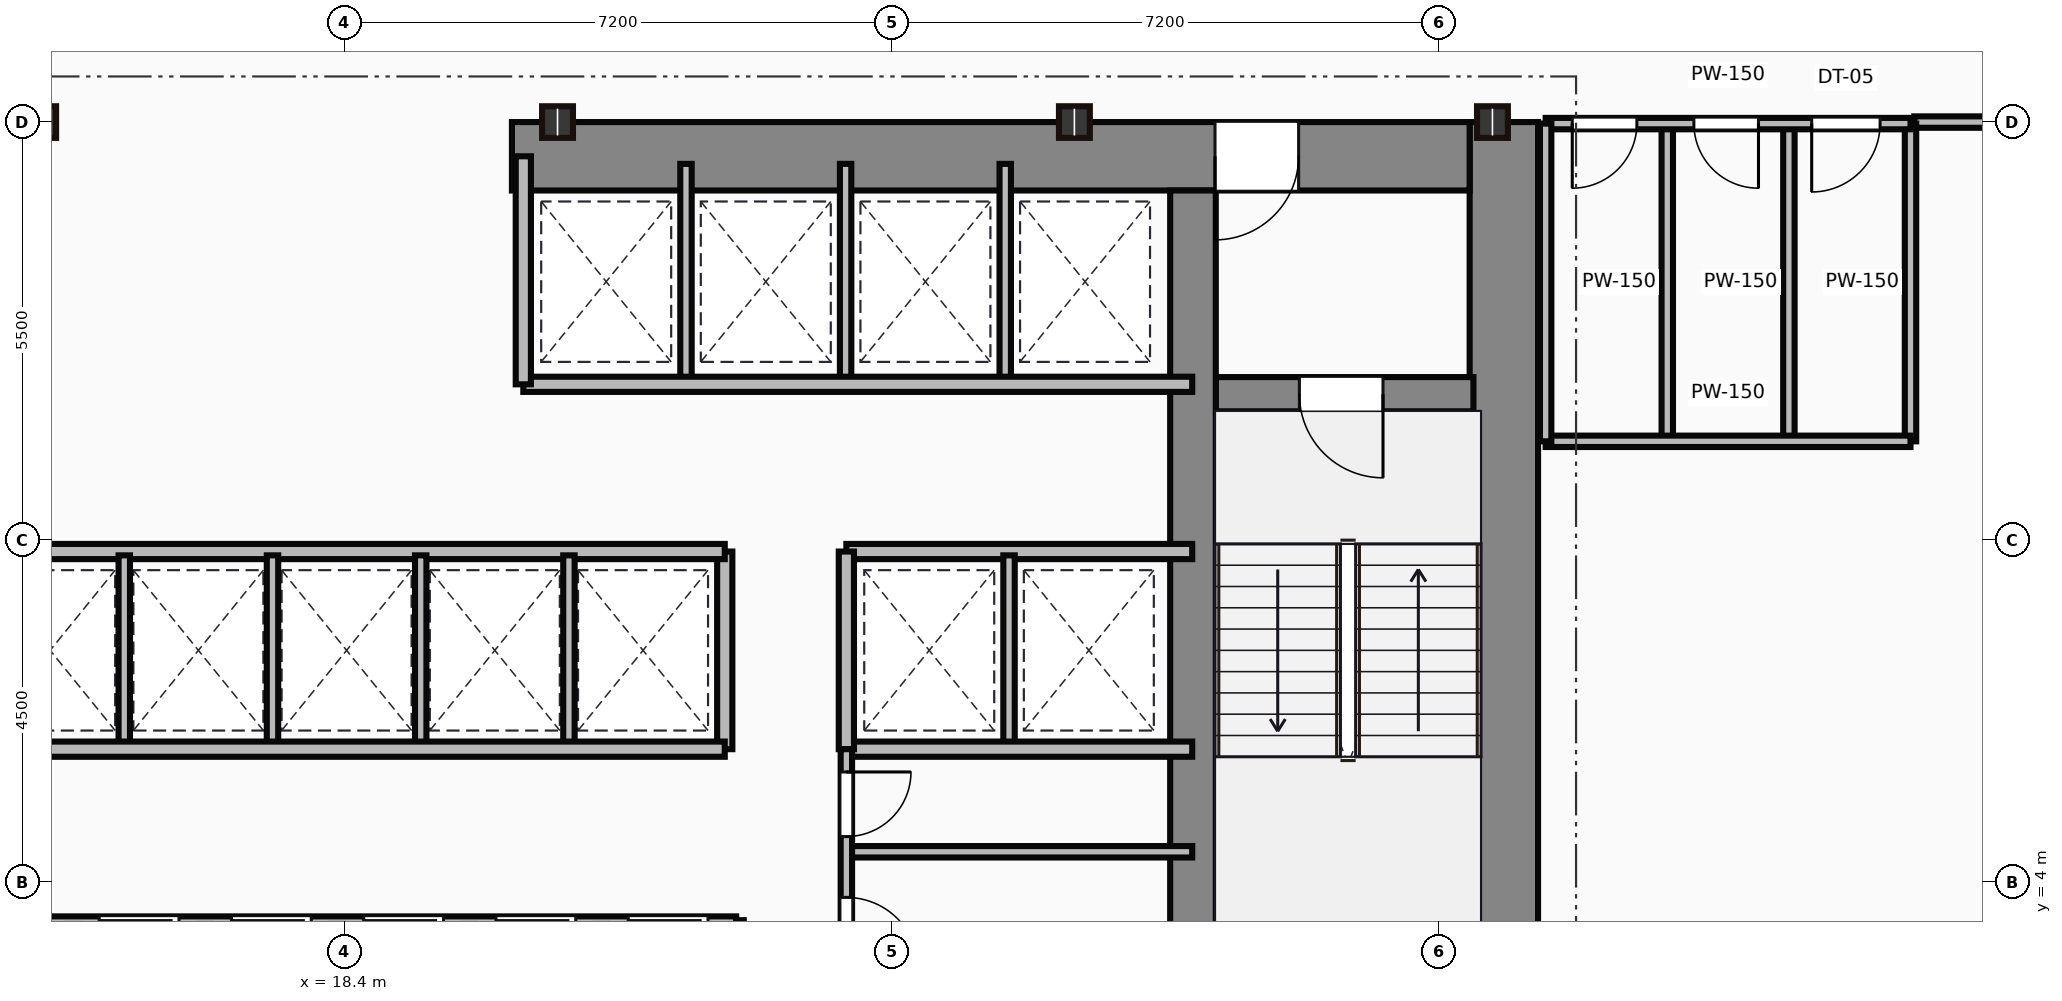
"""IFC4 building model, lengths in metres.
Left out: names, types, materials, properties, quantities, classifications, styles, units other than length and angle.
Written with IfcOpenShell. Run it as: python <this file> out.ifc"""

import sys

from ifc_helpers import new_model, si_unit, direction, frame, frame_2d, origin, origin_2d, place, context, subcontext, project, spatial, rectangle, i_section, extrude, source, transform, mapped, element, fill, save


model = new_model("IFC4")
c1 = context("Model", 3, precision=1e-05, world=origin(), true_north=direction((0.0, 1.0)))
c2 = subcontext(c1, "Body", "Model", "MODEL_VIEW")
j1 = project(units=[si_unit("LENGTHUNIT", "METRE"), si_unit("PLANEANGLEUNIT", "RADIAN")], contexts=[c1])
p1 = place(None, origin())
s1 = spatial("IfcSite", under=j1, at=p1, CompositionType="ELEMENT")
p2 = place(p1, origin())
s2 = spatial("IfcBuilding", under=s1, at=p2, CompositionType="ELEMENT")
p3 = place(p2, frame((0.0, 0.0, 72.65)))
s3 = spatial("IfcBuildingStorey", under=s2, at=p3, CompositionType="ELEMENT", Elevation=72.65)
m1 = source(origin(), c2, "Body", "SweptSolid", [
    extrude(rectangle(XDim=13.1, YDim=0.9, at=frame_2d((6.55, 0.0))), origin(), (0.0, 0.0, 1.0), 3.65),
])
p4 = place(p3, frame((33.65, 0.9, 0.0), z_axis=(0.0, 0.0, 1.0), x_axis=(0.0, 1.0, 0.0)))
e1 = element("IfcWall", 1, at=p4, inside=s3, PredefinedType="SHEAR", context=c2, shape_type="MappedRepresentation", body=[
    mapped(m1, transform((0.0, 0.0, 0.0))),
])
m2 = source(origin(), c2, "Body", "SweptSolid", [
    extrude(rectangle(XDim=12.6, YDim=0.9, at=frame_2d((6.3, 0.0))), origin(), (0.0, 0.0, 1.0), 3.65),
])
p5 = place(p3, frame((20.6, 13.55, 0.0), z_axis=(0.0, 0.0, 1.0), x_axis=(1.0, 0.0, 0.0)))
e2 = element("IfcWall", 2, at=p5, inside=s3, PredefinedType="SHEAR", context=c2, shape_type="MappedRepresentation", body=[
    mapped(m2, transform((0.0, 0.0, 0.0))),
])
p6 = place(p5, frame((9.25, 0.0, 0.0)))
e3 = element("IfcOpeningElement", 3, at=p6, cuts=e2, PredefinedType="OPENING", context=c2, shape_type="SweptSolid", body=[
    extrude(rectangle(XDim=1.1, YDim=2.15, at=frame_2d((0.55, 1.075))), frame((0.0, 0.46, 0.0), z_axis=(0.0, -1.0, 0.0), x_axis=(1.0, 0.0, 0.0)), (0.0, 0.0, 1.0), 0.92),
])
m3 = source(origin(), c2, "Body", "SweptSolid", [
    extrude(rectangle(XDim=12.2, YDim=0.6, at=frame_2d((6.1, 0.0))), origin(), (0.0, 0.0, 1.0), 3.65),
])
p7 = place(p3, frame((29.56, 0.9, 0.0), z_axis=(0.0, 0.0, 1.0), x_axis=(0.0, 1.0, 0.0)))
e4 = element("IfcWall", 4, at=p7, inside=s3, PredefinedType="SHEAR", context=c2, shape_type="MappedRepresentation", body=[
    mapped(m3, transform((0.0, 0.0, 0.0))),
])
m4 = source(origin(), c2, "Body", "SweptSolid", [
    extrude(rectangle(XDim=3.39, YDim=0.45, at=frame_2d((1.695, 0.0))), origin(), (0.0, 0.0, 1.0), 3.65),
])
p8 = place(p3, frame((29.86, 10.42, 0.0), z_axis=(0.0, 0.0, 1.0), x_axis=(1.0, 0.0, 0.0)))
e5 = element("IfcWall", 5, at=p8, inside=s3, PredefinedType="SHEAR", context=c2, shape_type="MappedRepresentation", body=[
    mapped(m4, transform((0.0, 0.0, 0.0))),
])
p9 = place(p8, frame((1.1, 0.0, 0.0)))
e6 = element("IfcOpeningElement", 6, at=p9, cuts=e5, PredefinedType="OPENING", context=c2, shape_type="SweptSolid", body=[
    extrude(rectangle(XDim=1.1, YDim=2.15, at=frame_2d((0.55, 1.075))), frame((0.0, 0.235, 0.0), z_axis=(0.0, -1.0, 0.0), x_axis=(1.0, 0.0, 0.0)), (0.0, 0.0, 1.0), 0.47),
])
m5 = source(origin(), c2, "Body", "SweptSolid", [
    extrude(i_section(OverallWidth=0.406, OverallDepth=0.416, WebThickness=0.03, FlangeThickness=0.048, at=origin_2d()), origin(), (0.0, 0.0, 1.0), 3.65),
])
for number, where, z_axis, x_axis in (
    (7, (14.4, 14.0, 0.0), (0.0, 0.0, 1.0), (1.0, 0.0, 0.0)),
    (8, (21.2, 14.0, 0.0), (0.0, 0.0, 1.0), (1.0, 0.0, 0.0)),
    (9, (28.0, 14.0, 0.0), (0.0, 0.0, 1.0), (1.0, 0.0, 0.0)),
    (10, (33.5, 14.0, 0.0), (0.0, 0.0, 1.0), (1.0, 0.0, 0.0)),
):
    element("IfcColumn", number, at=place(p3, frame(where, z_axis=z_axis, x_axis=x_axis)), inside=s3, PredefinedType="COLUMN", context=c2, shape_type="MappedRepresentation", body=[
        mapped(m5, transform((0.0, 0.0, 0.0))),
    ])
m6 = source(origin(), c2, "Body", "SweptSolid", [
    extrude(rectangle(XDim=10.5, YDim=0.2, at=frame_2d((5.25, 0.0))), origin(), (0.0, 0.0, 1.0), 3.4),
])
p10 = place(p3, frame((13.05, 3.45, 0.0), z_axis=(0.0, 0.0, 1.0), x_axis=(1.0, 0.0, 0.0)))
e11 = element("IfcWall", 11, at=p10, inside=s3, PredefinedType="PARTITIONING", context=c2, shape_type="MappedRepresentation", body=[
    mapped(m6, transform((0.0, 0.0, 0.0))),
])
p11 = place(p10, frame((0.38, 0.0, 0.0)))
e12 = element("IfcOpeningElement", 12, at=p11, cuts=e11, PredefinedType="OPENING", context=c2, shape_type="SweptSolid", body=[
    extrude(rectangle(XDim=1.05, YDim=2.15, at=frame_2d((0.525, 1.075))), frame((0.0, 0.11, 0.0), z_axis=(0.0, -1.0, 0.0), x_axis=(1.0, 0.0, 0.0)), (0.0, 0.0, 1.0), 0.22),
])
p12 = place(p10, frame((2.12, 0.0, 0.0)))
e13 = element("IfcOpeningElement", 13, at=p12, cuts=e11, PredefinedType="OPENING", context=c2, shape_type="SweptSolid", body=[
    extrude(rectangle(XDim=1.05, YDim=2.15, at=frame_2d((0.525, 1.075))), frame((0.0, 0.11, 0.0), z_axis=(0.0, -1.0, 0.0), x_axis=(1.0, 0.0, 0.0)), (0.0, 0.0, 1.0), 0.22),
])
p13 = place(p10, frame((3.86, 0.0, 0.0)))
e14 = element("IfcOpeningElement", 14, at=p13, cuts=e11, PredefinedType="OPENING", context=c2, shape_type="SweptSolid", body=[
    extrude(rectangle(XDim=1.05, YDim=2.15, at=frame_2d((0.525, 1.075))), frame((0.0, 0.11, 0.0), z_axis=(0.0, -1.0, 0.0), x_axis=(1.0, 0.0, 0.0)), (0.0, 0.0, 1.0), 0.22),
])
p14 = place(p10, frame((5.6, 0.0, 0.0)))
e15 = element("IfcOpeningElement", 15, at=p14, cuts=e11, PredefinedType="OPENING", context=c2, shape_type="SweptSolid", body=[
    extrude(rectangle(XDim=1.05, YDim=2.15, at=frame_2d((0.525, 1.075))), frame((0.0, 0.11, 0.0), z_axis=(0.0, -1.0, 0.0), x_axis=(1.0, 0.0, 0.0)), (0.0, 0.0, 1.0), 0.22),
])
p15 = place(p10, frame((7.34, 0.0, 0.0)))
e16 = element("IfcOpeningElement", 16, at=p15, cuts=e11, PredefinedType="OPENING", context=c2, shape_type="SweptSolid", body=[
    extrude(rectangle(XDim=1.05, YDim=2.15, at=frame_2d((0.525, 1.075))), frame((0.0, 0.11, 0.0), z_axis=(0.0, -1.0, 0.0), x_axis=(1.0, 0.0, 0.0)), (0.0, 0.0, 1.0), 0.22),
])
p16 = place(p10, frame((9.08, 0.0, 0.0)))
e17 = element("IfcOpeningElement", 17, at=p16, cuts=e11, PredefinedType="OPENING", context=c2, shape_type="SweptSolid", body=[
    extrude(rectangle(XDim=1.05, YDim=2.15, at=frame_2d((0.525, 1.075))), frame((0.0, 0.11, 0.0), z_axis=(0.0, -1.0, 0.0), x_axis=(1.0, 0.0, 0.0)), (0.0, 0.0, 1.0), 0.22),
])
m7 = source(origin(), c2, "Body", "SweptSolid", [
    extrude(rectangle(XDim=2.65, YDim=0.2, at=frame_2d((1.325, 0.0))), origin(), (0.0, 0.0, 1.0), 3.4),
])
p17 = place(p3, frame((23.55, 0.85, 0.0), z_axis=(0.0, 0.0, 1.0), x_axis=(0.0, 1.0, 0.0)))
e18 = element("IfcWall", 18, at=p17, inside=s3, PredefinedType="PARTITIONING", context=c2, shape_type="MappedRepresentation", body=[
    mapped(m7, transform((0.0, 0.0, 0.0))),
])
m8 = source(origin(), c2, "Body", "SweptSolid", [
    extrude(rectangle(XDim=11.85, YDim=0.2, at=frame_2d((5.925, 0.0))), origin(), (0.0, 0.0, 1.0), 3.4),
])
for number, where, z_axis, x_axis in (
    (19, (11.55, 5.75, 0.0), (0.0, 0.0, 1.0), (1.0, 0.0, 0.0)),
    (20, (11.55, 8.35, 0.0), (0.0, 0.0, 1.0), (1.0, 0.0, 0.0)),
):
    element("IfcWall", number, at=place(p3, frame(where, z_axis=z_axis, x_axis=x_axis)), inside=s3, PredefinedType="PARTITIONING", context=c2, shape_type="MappedRepresentation", body=[
        mapped(m8, transform((0.0, 0.0, 0.0))),
    ])
m9 = source(origin(), c2, "Body", "SweptSolid", [
    extrude(rectangle(XDim=2.6, YDim=0.2, at=frame_2d((1.3, 0.0))), origin(), (0.0, 0.0, 1.0), 3.4),
])
p18 = place(p3, frame((23.4, 5.75, 0.0), z_axis=(0.0, 0.0, 1.0), x_axis=(0.0, 1.0, 0.0)))
e21 = element("IfcWall", 21, at=p18, inside=s3, PredefinedType="PARTITIONING", context=c2, shape_type="MappedRepresentation", body=[
    mapped(m9, transform((0.0, 0.0, 0.0))),
])
m10 = source(origin(), c2, "Body", "SweptSolid", [
    extrude(rectangle(XDim=2.5, YDim=0.15, at=frame_2d((1.25, 0.0))), origin(), (0.0, 0.0, 1.0), 3.4),
])
for number, where, z_axis, x_axis in (
    (22, (15.5, 5.8, 0.0), (0.0, 0.0, 1.0), (0.0, 1.0, 0.0)),
    (23, (17.45, 5.8, 0.0), (0.0, 0.0, 1.0), (0.0, 1.0, 0.0)),
    (24, (19.4, 5.8, 0.0), (0.0, 0.0, 1.0), (0.0, 1.0, 0.0)),
    (25, (21.35, 5.8, 0.0), (0.0, 0.0, 1.0), (0.0, 1.0, 0.0)),
):
    element("IfcWall", number, at=place(p3, frame(where, z_axis=z_axis, x_axis=x_axis)), inside=s3, PredefinedType="PARTITIONING", context=c2, shape_type="MappedRepresentation", body=[
        mapped(m10, transform((0.0, 0.0, 0.0))),
    ])
m11 = source(origin(), c2, "Body", "SweptSolid", [
    extrude(rectangle(XDim=8.8, YDim=0.2, at=frame_2d((4.4, 0.0))), origin(), (0.0, 0.0, 1.0), 3.4),
])
p19 = place(p3, frame((20.75, 10.55, 0.0), z_axis=(0.0, 0.0, 1.0), x_axis=(1.0, 0.0, 0.0)))
e26 = element("IfcWall", 26, at=p19, inside=s3, PredefinedType="PARTITIONING", context=c2, shape_type="MappedRepresentation", body=[
    mapped(m11, transform((0.0, 0.0, 0.0))),
])
m12 = source(origin(), c2, "Body", "SweptSolid", [
    extrude(rectangle(XDim=3.0, YDim=0.2, at=frame_2d((1.5, 0.0))), origin(), (0.0, 0.0, 1.0), 3.4),
])
p20 = place(p3, frame((20.75, 10.55, 0.0), z_axis=(0.0, 0.0, 1.0), x_axis=(0.0, 1.0, 0.0)))
e27 = element("IfcWall", 27, at=p20, inside=s3, PredefinedType="PARTITIONING", context=c2, shape_type="MappedRepresentation", body=[
    mapped(m12, transform((0.0, 0.0, 0.0))),
])
m13 = source(origin(), c2, "Body", "SweptSolid", [
    extrude(rectangle(XDim=2.85, YDim=0.15, at=frame_2d((1.425, 0.0))), origin(), (0.0, 0.0, 1.0), 3.4),
])
for number, where, z_axis, x_axis in (
    (28, (22.89, 10.6, 0.0), (0.0, 0.0, 1.0), (0.0, 1.0, 0.0)),
    (29, (24.99, 10.6, 0.0), (0.0, 0.0, 1.0), (0.0, 1.0, 0.0)),
    (30, (27.09, 10.6, 0.0), (0.0, 0.0, 1.0), (0.0, 1.0, 0.0)),
):
    element("IfcWall", number, at=place(p3, frame(where, z_axis=z_axis, x_axis=x_axis)), inside=s3, PredefinedType="PARTITIONING", context=c2, shape_type="MappedRepresentation", body=[
        mapped(m13, transform((0.0, 0.0, 0.0))),
    ])
m14 = source(origin(), c2, "Body", "SweptSolid", [
    extrude(rectangle(XDim=4.55, YDim=0.2, at=frame_2d((2.275, 0.0))), origin(), (0.0, 0.0, 1.0), 3.4),
])
for number, where, z_axis, x_axis in (
    (31, (25.0, 8.35, 0.0), (0.0, 0.0, 1.0), (1.0, 0.0, 0.0)),
    (32, (25.0, 5.75, 0.0), (0.0, 0.0, 1.0), (1.0, 0.0, 0.0)),
):
    element("IfcWall", number, at=place(p3, frame(where, z_axis=z_axis, x_axis=x_axis)), inside=s3, PredefinedType="PARTITIONING", context=c2, shape_type="MappedRepresentation", body=[
        mapped(m14, transform((0.0, 0.0, 0.0))),
    ])
p21 = place(p3, frame((25.0, 5.75, 0.0), z_axis=(0.0, 0.0, 1.0), x_axis=(0.0, 1.0, 0.0)))
e33 = element("IfcWall", 33, at=p21, inside=s3, PredefinedType="PARTITIONING", context=c2, shape_type="MappedRepresentation", body=[
    mapped(m9, transform((0.0, 0.0, 0.0))),
])
p22 = place(p3, frame((27.14, 5.8, 0.0), z_axis=(0.0, 0.0, 1.0), x_axis=(0.0, 1.0, 0.0)))
e34 = element("IfcWall", 34, at=p22, inside=s3, PredefinedType="PARTITIONING", context=c2, shape_type="MappedRepresentation", body=[
    mapped(m10, transform((0.0, 0.0, 0.0))),
])
m15 = source(origin(), c2, "Body", "SweptSolid", [
    extrude(rectangle(XDim=4.9, YDim=0.15, at=frame_2d((2.45, 0.0))), origin(), (0.0, 0.0, 1.0), 3.4),
])
p23 = place(p3, frame((25.0, 0.85, 0.0), z_axis=(0.0, 0.0, 1.0), x_axis=(0.0, 1.0, 0.0)))
e35 = element("IfcWall", 35, at=p23, inside=s3, PredefinedType="PARTITIONING", context=c2, shape_type="MappedRepresentation", body=[
    mapped(m15, transform((0.0, 0.0, 0.0))),
])
p24 = place(p23, frame((2.0, 0.0, 0.0)))
e36 = element("IfcOpeningElement", 36, at=p24, cuts=e35, PredefinedType="OPENING", context=c2, shape_type="SweptSolid", body=[
    extrude(rectangle(XDim=0.95, YDim=2.15, at=frame_2d((0.475, 1.075))), frame((0.0, 0.085, 0.0), z_axis=(0.0, -1.0, 0.0), x_axis=(1.0, 0.0, 0.0)), (0.0, 0.0, 1.0), 0.17),
])
p25 = place(p23, frame((3.75, 0.0, 0.0)))
e37 = element("IfcOpeningElement", 37, at=p25, cuts=e35, PredefinedType="OPENING", context=c2, shape_type="SweptSolid", body=[
    extrude(rectangle(XDim=0.85, YDim=2.15, at=frame_2d((0.425, 1.075))), frame((0.0, 0.085, 0.0), z_axis=(0.0, -1.0, 0.0), x_axis=(1.0, 0.0, 0.0)), (0.0, 0.0, 1.0), 0.17),
])
m16 = source(origin(), c2, "Body", "SweptSolid", [
    extrude(rectangle(XDim=4.55, YDim=0.15, at=frame_2d((2.275, 0.0))), origin(), (0.0, 0.0, 1.0), 3.4),
])
p26 = place(p3, frame((25.0, 4.4, 0.0), z_axis=(0.0, 0.0, 1.0), x_axis=(1.0, 0.0, 0.0)))
e38 = element("IfcWall", 38, at=p26, inside=s3, PredefinedType="PARTITIONING", context=c2, shape_type="MappedRepresentation", body=[
    mapped(m16, transform((0.0, 0.0, 0.0))),
])
m17 = source(origin(), c2, "Body", "SweptSolid", [
    extrude(rectangle(XDim=4.8, YDim=0.15, at=frame_2d((2.4, 0.0))), origin(), (0.0, 0.0, 1.0), 2.625),
])
p27 = place(p3, frame((34.2, 13.98, 0.0), z_axis=(0.0, 0.0, 1.0), x_axis=(1.0, 0.0, 0.0)))
e39 = element("IfcWall", 39, at=p27, inside=s3, PredefinedType="PARTITIONING", context=c2, shape_type="MappedRepresentation", body=[
    mapped(m17, transform((0.0, 0.0, 0.0))),
])
p28 = place(p27, frame((0.35, 0.0, 0.0)))
e40 = element("IfcOpeningElement", 40, at=p28, cuts=e39, PredefinedType="OPENING", context=c2, shape_type="SweptSolid", body=[
    extrude(rectangle(XDim=0.85, YDim=2.1, at=frame_2d((0.425, 1.05))), frame((0.0, 0.085, 0.0), z_axis=(0.0, -1.0, 0.0), x_axis=(1.0, 0.0, 0.0)), (0.0, 0.0, 1.0), 0.17),
])
p29 = place(p27, frame((1.95, 0.0, 0.0)))
e41 = element("IfcOpeningElement", 41, at=p29, cuts=e39, PredefinedType="OPENING", context=c2, shape_type="SweptSolid", body=[
    extrude(rectangle(XDim=0.85, YDim=2.1, at=frame_2d((0.425, 1.05))), frame((0.0, 0.085, 0.0), z_axis=(0.0, -1.0, 0.0), x_axis=(1.0, 0.0, 0.0)), (0.0, 0.0, 1.0), 0.17),
])
p30 = place(p27, frame((3.5, 0.0, 0.0)))
e42 = element("IfcOpeningElement", 42, at=p30, cuts=e39, PredefinedType="OPENING", context=c2, shape_type="SweptSolid", body=[
    extrude(rectangle(XDim=0.9, YDim=2.1, at=frame_2d((0.45, 1.05))), frame((0.0, 0.085, 0.0), z_axis=(0.0, -1.0, 0.0), x_axis=(1.0, 0.0, 0.0)), (0.0, 0.0, 1.0), 0.17),
])
m18 = source(origin(), c2, "Body", "SweptSolid", [
    extrude(rectangle(XDim=4.8, YDim=0.15, at=frame_2d((2.4, 0.0))), origin(), (0.0, 0.0, 1.0), 3.4),
])
p31 = place(p3, frame((34.2, 9.8, 0.0), z_axis=(0.0, 0.0, 1.0), x_axis=(1.0, 0.0, 0.0)))
e43 = element("IfcWall", 43, at=p31, inside=s3, PredefinedType="PARTITIONING", context=c2, shape_type="MappedRepresentation", body=[
    mapped(m18, transform((0.0, 0.0, 0.0))),
])
m19 = source(origin(), c2, "Body", "SweptSolid", [
    extrude(rectangle(XDim=4.18, YDim=0.15, at=frame_2d((2.09, 0.0))), origin(), (0.0, 0.0, 1.0), 3.4),
])
for number, where, z_axis, x_axis in (
    (44, (39.0, 9.8, 0.0), (0.0, 0.0, 1.0), (0.0, 1.0, 0.0)),
    (45, (34.2, 9.8, 0.0), (0.0, 0.0, 1.0), (0.0, 1.0, 0.0)),
    (46, (35.8, 9.8, 0.0), (0.0, 0.0, 1.0), (0.0, 1.0, 0.0)),
    (47, (37.4, 9.8, 0.0), (0.0, 0.0, 1.0), (0.0, 1.0, 0.0)),
):
    element("IfcWall", number, at=place(p3, frame(where, z_axis=z_axis, x_axis=x_axis)), inside=s3, PredefinedType="PARTITIONING", context=c2, shape_type="MappedRepresentation", body=[
        mapped(m19, transform((0.0, 0.0, 0.0))),
    ])
m20 = source(origin(), c2, "Body", "SweptSolid", [
    extrude(rectangle(XDim=7.75, YDim=0.15, at=frame_2d((3.875, 0.0))), origin(), (0.0, 0.0, 1.0), 2.625),
])
p32 = place(p3, frame((46.8, 14.0, 0.0), z_axis=(0.0, 0.0, 1.0), x_axis=(-1.0, 0.0, 0.0)))
e48 = element("IfcWall", 48, at=p32, inside=s3, PredefinedType="PARTITIONING", context=c2, shape_type="MappedRepresentation", body=[
    mapped(m20, transform((0.0, 0.0, 0.0))),
])
m21 = source(origin(), c2, "Body", "SweptSolid", [
    extrude(rectangle(XDim=1.1, YDim=2.15, at=frame_2d((0.55, 1.075))), frame((0.0, 0.025, 0.0), z_axis=(0.0, -1.0, 0.0), x_axis=(1.0, 0.0, 0.0)), (0.0, 0.0, 1.0), 0.05),
])
p33 = place(p9, frame((1.1, 0.0, 0.0), z_axis=(0.0, 0.0, 1.0), x_axis=(-1.0, 0.0, 0.0)))
e49 = element("IfcDoor", 49, at=p33, inside=s3, OperationType="SINGLE_SWING_RIGHT", PredefinedType="DOOR", context=c2, shape_type="MappedRepresentation", body=[
    mapped(m21, transform((0.0, 0.0, 0.0))),
])
fill(e6, e49)
p34 = place(p6, origin())
e50 = element("IfcDoor", 50, at=p34, inside=s3, OperationType="SINGLE_SWING_LEFT", PredefinedType="DOOR", context=c2, shape_type="MappedRepresentation", body=[
    mapped(m21, transform((0.0, 0.0, 0.0))),
])
fill(e3, e50)
m22 = source(origin(), c2, "Body", "SweptSolid", [
    extrude(rectangle(XDim=0.95, YDim=2.15, at=frame_2d((0.475, 1.075))), frame((0.0, 0.025, 0.0), z_axis=(0.0, -1.0, 0.0), x_axis=(1.0, 0.0, 0.0)), (0.0, 0.0, 1.0), 0.05),
])
p35 = place(p24, origin())
e51 = element("IfcDoor", 51, at=p35, inside=s3, OperationType="SINGLE_SWING_LEFT", PredefinedType="DOOR", context=c2, shape_type="MappedRepresentation", body=[
    mapped(m22, transform((0.0, 0.0, 0.0))),
])
fill(e36, e51)
m23 = source(origin(), c2, "Body", "SweptSolid", [
    extrude(rectangle(XDim=0.85, YDim=2.15, at=frame_2d((0.425, 1.075))), frame((0.0, 0.025, 0.0), z_axis=(0.0, -1.0, 0.0), x_axis=(1.0, 0.0, 0.0)), (0.0, 0.0, 1.0), 0.05),
])
p36 = place(p25, origin())
e52 = element("IfcDoor", 52, at=p36, inside=s3, OperationType="SINGLE_SWING_RIGHT", PredefinedType="DOOR", context=c2, shape_type="MappedRepresentation", body=[
    mapped(m23, transform((0.0, 0.0, 0.0))),
])
fill(e37, e52)
m24 = source(origin(), c2, "Body", "SweptSolid", [
    extrude(rectangle(XDim=0.85, YDim=2.1, at=frame_2d((0.425, 1.05))), frame((0.0, 0.025, 0.0), z_axis=(0.0, -1.0, 0.0), x_axis=(1.0, 0.0, 0.0)), (0.0, 0.0, 1.0), 0.05),
])
p37 = place(p28, frame((0.85, 0.0, 0.0), z_axis=(0.0, 0.0, 1.0), x_axis=(-1.0, 0.0, 0.0)))
e53 = element("IfcDoor", 53, at=p37, inside=s3, OperationType="SINGLE_SWING_LEFT", PredefinedType="DOOR", context=c2, shape_type="MappedRepresentation", body=[
    mapped(m24, transform((0.0, 0.0, 0.0))),
])
fill(e40, e53)
p38 = place(p29, frame((0.85, 0.0, 0.0), z_axis=(0.0, 0.0, 1.0), x_axis=(-1.0, 0.0, 0.0)))
e54 = element("IfcDoor", 54, at=p38, inside=s3, OperationType="SINGLE_SWING_RIGHT", PredefinedType="DOOR", context=c2, shape_type="MappedRepresentation", body=[
    mapped(m24, transform((0.0, 0.0, 0.0))),
])
fill(e41, e54)
m25 = source(origin(), c2, "Body", "SweptSolid", [
    extrude(rectangle(XDim=0.9, YDim=2.1, at=frame_2d((0.45, 1.05))), frame((0.0, 0.025, 0.0), z_axis=(0.0, -1.0, 0.0), x_axis=(1.0, 0.0, 0.0)), (0.0, 0.0, 1.0), 0.05),
])
p39 = place(p30, frame((0.9, 0.0, 0.0), z_axis=(0.0, 0.0, 1.0), x_axis=(-1.0, 0.0, 0.0)))
e55 = element("IfcDoor", 55, at=p39, inside=s3, OperationType="SINGLE_SWING_LEFT", PredefinedType="DOOR", context=c2, shape_type="MappedRepresentation", body=[
    mapped(m25, transform((0.0, 0.0, 0.0))),
])
fill(e42, e55)
save(model, sys.argv[1])
